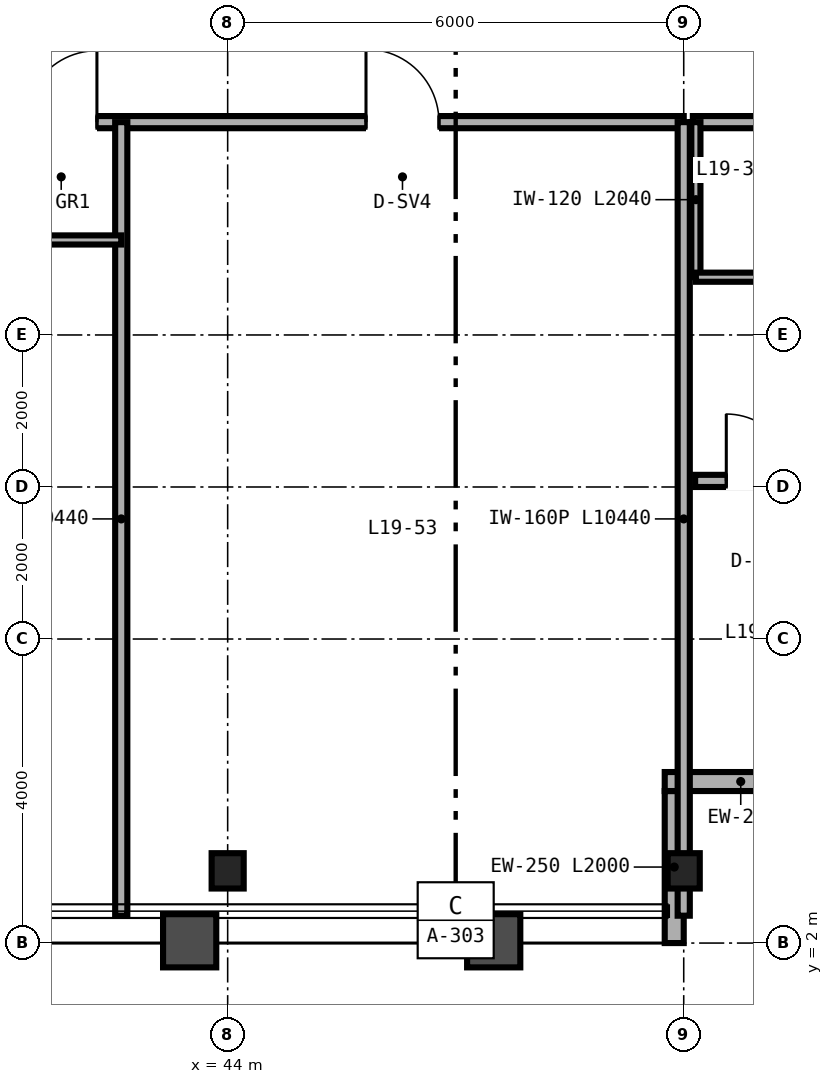
"""IFC4 building model, lengths in metres.
Left out: names, types, materials, properties, quantities, classifications, styles, units other than length and angle.
Written with IfcOpenShell. Run it as: python <this file> out.ifc"""

import sys

from ifc_helpers import new_model, si_unit, direction, frame, frame_2d, origin, origin_2d, place, context, subcontext, project, spatial, rectangle, i_section, extrude, source, transform, mapped, element, fill, save


model = new_model("IFC4")
c1 = context("Model", 3, precision=1e-05, world=origin(), true_north=direction((0.0, 1.0)))
c2 = subcontext(c1, "Body", "Model", "MODEL_VIEW")
j1 = project(units=[si_unit("LENGTHUNIT", "METRE"), si_unit("PLANEANGLEUNIT", "RADIAN")], contexts=[c1])
p1 = place(None, origin())
s1 = spatial("IfcSite", under=j1, at=p1, CompositionType="ELEMENT")
p2 = place(p1, origin())
s2 = spatial("IfcBuilding", under=s1, at=p2, CompositionType="ELEMENT")
p3 = place(p2, frame((0.0, 0.0, 78.0)))
s3 = spatial("IfcBuildingStorey", under=s2, at=p3, CompositionType="ELEMENT", Elevation=78.0)
m1 = source(origin(), c2, "Body", "SweptSolid", [
    extrude(i_section(OverallWidth=0.422, OverallDepth=0.465, WebThickness=0.045, FlangeThickness=0.073, FilletRadius=0.025, at=origin_2d()), origin(), (0.0, 0.0, 1.0), 3.35),
])
for number, where, z_axis, x_axis in (
    (1, (44.0, 2.95, 0.0), (0.0, 0.0, 1.0), (1.0, 0.0, 0.0)),
    (2, (50.0, 2.95, 0.0), (0.0, 0.0, 1.0), (1.0, 0.0, 0.0)),
):
    element("IfcColumn", number, at=place(p3, frame(where, z_axis=z_axis, x_axis=x_axis)), inside=s3, PredefinedType="COLUMN", context=c2, shape_type="MappedRepresentation", body=[
        mapped(m1, transform((0.0, 0.0, 0.0), scale=1.0)),
    ])
p4 = place(p3, frame((49.875, 2.0, 0.0), z_axis=(0.0, 0.0, 1.0), x_axis=(0.0, 1.0, 0.0)))
e3 = element("IfcWall", 3, at=p4, inside=s3, PredefinedType="SOLIDWALL", context=c2, shape_type="SweptSolid", body=[
    extrude(rectangle(XDim=2.0, YDim=0.25, at=frame_2d((1.0, 0.0))), origin(), (0.0, 0.0, 1.0), 2.657),
])
p5 = place(p3, frame((49.75, 4.125, 0.0), z_axis=(0.0, 0.0, 1.0), x_axis=(1.0, 0.0, 0.0)))
e4 = element("IfcWall", 4, at=p5, inside=s3, PredefinedType="SOLIDWALL", context=c2, shape_type="SweptSolid", body=[
    extrude(rectangle(XDim=2.0, YDim=0.25, at=frame_2d((1.0, 0.0))), origin(), (0.0, 0.0, 1.0), 3.35),
])
p6 = place(p3, frame((50.12, 12.8, 0.0), z_axis=(0.0, 0.0, 1.0), x_axis=(1.0, 0.0, 0.0)))
e5 = element("IfcWall", 5, at=p6, inside=s3, PredefinedType="PARTITIONING", context=c2, shape_type="SweptSolid", body=[
    extrude(rectangle(XDim=5.68, YDim=0.16, at=frame_2d((2.84, 0.0))), origin(), (0.0, 0.0, 1.0), 3.35),
])
p7 = place(p6, frame((3.15, 0.0, 0.0)))
e6 = element("IfcOpeningElement", 6, at=p7, cuts=e5, PredefinedType="OPENING", context=c2, shape_type="SweptSolid", body=[
    extrude(rectangle(XDim=0.94, YDim=2.15, at=frame_2d((0.47, 1.075))), frame((0.0, 0.09, 0.0), z_axis=(0.0, -1.0, 0.0), x_axis=(1.0, 0.0, 0.0)), (0.0, 0.0, 1.0), 0.18),
])
p8 = place(p3, frame((50.16, 10.76, 0.0), z_axis=(0.0, 0.0, 1.0), x_axis=(0.0, 1.0, 0.0)))
e7 = element("IfcWall", 7, at=p8, inside=s3, PredefinedType="PARTITIONING", context=c2, shape_type="SweptSolid", body=[
    extrude(rectangle(XDim=2.04, YDim=0.12, at=frame_2d((1.02, 0.0))), origin(), (0.0, 0.0, 1.0), 3.35),
])
p9 = place(p3, frame((50.16, 10.76, 0.0), z_axis=(0.0, 0.0, 1.0), x_axis=(1.0, 0.0, 0.0)))
e8 = element("IfcWall", 8, at=p9, inside=s3, PredefinedType="PARTITIONING", context=c2, shape_type="SweptSolid", body=[
    extrude(rectangle(XDim=1.65, YDim=0.12, at=frame_2d((0.825, 0.0))), origin(), (0.0, 0.0, 1.0), 3.35),
])
p10 = place(p3, frame((50.15, 8.08, 0.0), z_axis=(0.0, 0.0, 1.0), x_axis=(1.0, 0.0, 0.0)))
e9 = element("IfcWall", 9, at=p10, inside=s3, PredefinedType="PARTITIONING", context=c2, shape_type="SweptSolid", body=[
    extrude(rectangle(XDim=1.7, YDim=0.16, at=frame_2d((0.85, 0.0))), origin(), (0.0, 0.0, 1.0), 3.35),
])
p11 = place(p10, frame((0.41, 0.0, 0.0)))
e10 = element("IfcOpeningElement", 10, at=p11, cuts=e9, PredefinedType="OPENING", context=c2, shape_type="SweptSolid", body=[
    extrude(rectangle(XDim=0.88, YDim=2.15, at=frame_2d((0.44, 1.075))), frame((0.0, 0.09, 0.0), z_axis=(0.0, -1.0, 0.0), x_axis=(1.0, 0.0, 0.0)), (0.0, 0.0, 1.0), 0.18),
])
p12 = place(p3, frame((14.0, 12.8, 0.0), z_axis=(0.0, 0.0, 1.0), x_axis=(1.0, 0.0, 0.0)))
e11 = element("IfcWall", 11, at=p12, inside=s3, PredefinedType="PARTITIONING", context=c2, shape_type="SweptSolid", body=[
    extrude(rectangle(XDim=36.0, YDim=0.16, at=frame_2d((18.0, 0.0))), origin(), (0.0, 0.0, 1.0), 2.571),
])
p13 = place(p12, frame((5.9, 0.0, 0.0)))
e12 = element("IfcOpeningElement", 12, at=p13, cuts=e11, PredefinedType="OPENING", context=c2, shape_type="SweptSolid", body=[
    extrude(rectangle(XDim=0.98, YDim=2.2, at=frame_2d((0.49, 1.1))), frame((0.0, 0.09, 0.0), z_axis=(0.0, -1.0, 0.0), x_axis=(1.0, 0.0, 0.0)), (0.0, 0.0, 1.0), 0.18),
])
p14 = place(p12, frame((13.1, 0.0, 0.0)))
e13 = element("IfcOpeningElement", 13, at=p14, cuts=e11, PredefinedType="OPENING", context=c2, shape_type="SweptSolid", body=[
    extrude(rectangle(XDim=0.98, YDim=2.2, at=frame_2d((0.49, 1.1))), frame((0.0, 0.09, 0.0), z_axis=(0.0, -1.0, 0.0), x_axis=(1.0, 0.0, 0.0)), (0.0, 0.0, 1.0), 0.18),
])
p15 = place(p12, frame((20.34, 0.0, 0.0)))
e14 = element("IfcOpeningElement", 14, at=p15, cuts=e11, PredefinedType="OPENING", context=c2, shape_type="SweptSolid", body=[
    extrude(rectangle(XDim=0.94, YDim=2.15, at=frame_2d((0.47, 1.075))), frame((0.0, 0.09, 0.0), z_axis=(0.0, -1.0, 0.0), x_axis=(1.0, 0.0, 0.0)), (0.0, 0.0, 1.0), 0.18),
])
p16 = place(p12, frame((27.34, 0.0, 0.0)))
e15 = element("IfcOpeningElement", 15, at=p16, cuts=e11, PredefinedType="OPENING", context=c2, shape_type="SweptSolid", body=[
    extrude(rectangle(XDim=0.94, YDim=2.15, at=frame_2d((0.47, 1.075))), frame((0.0, 0.09, 0.0), z_axis=(0.0, -1.0, 0.0), x_axis=(1.0, 0.0, 0.0)), (0.0, 0.0, 1.0), 0.18),
])
p17 = place(p12, frame((31.82, 0.0, 0.0)))
e16 = element("IfcOpeningElement", 16, at=p17, cuts=e11, PredefinedType="OPENING", context=c2, shape_type="SweptSolid", body=[
    extrude(rectangle(XDim=0.96, YDim=2.15, at=frame_2d((0.48, 1.075))), frame((0.0, 0.09, 0.0), z_axis=(0.0, -1.0, 0.0), x_axis=(1.0, 0.0, 0.0)), (0.0, 0.0, 1.0), 0.18),
])
p18 = place(p3, frame((50.0, 2.36, 0.0), z_axis=(0.0, 0.0, 1.0), x_axis=(0.0, 1.0, 0.0)))
e17 = element("IfcWall", 17, at=p18, inside=s3, PredefinedType="PARTITIONING", context=c2, shape_type="SweptSolid", body=[
    extrude(rectangle(XDim=10.44, YDim=0.16, at=frame_2d((5.22, 0.0))), origin(), (0.0, 0.0, 1.0), 2.657),
])
p19 = place(p3, frame((42.6, 2.36, 0.0), z_axis=(0.0, 0.0, 1.0), x_axis=(0.0, 1.0, 0.0)))
e18 = element("IfcWall", 18, at=p19, inside=s3, PredefinedType="PARTITIONING", context=c2, shape_type="SweptSolid", body=[
    extrude(rectangle(XDim=10.44, YDim=0.16, at=frame_2d((5.22, 0.0))), origin(), (0.0, 0.0, 1.0), 2.813),
])
p20 = place(p3, frame((41.5, 11.25, 0.0), z_axis=(0.0, 0.0, 1.0), x_axis=(1.0, 0.0, 0.0)))
e19 = element("IfcWall", 19, at=p20, inside=s3, PredefinedType="PARTITIONING", context=c2, shape_type="SweptSolid", body=[
    extrude(rectangle(XDim=1.1, YDim=0.12, at=frame_2d((0.55, 0.0))), origin(), (0.0, 0.0, 1.0), 3.35),
])
m2 = source(origin(), c2, "Body", "SweptSolid", [
    extrude(rectangle(XDim=0.88, YDim=2.15, at=frame_2d((0.44, 1.075))), frame((0.0, 0.025, 0.0), z_axis=(0.0, -1.0, 0.0), x_axis=(1.0, 0.0, 0.0)), (0.0, 0.0, 1.0), 0.05),
])
p21 = place(p11, origin())
e20 = element("IfcDoor", 20, at=p21, inside=s3, OperationType="SINGLE_SWING_LEFT", PredefinedType="DOOR", context=c2, shape_type="MappedRepresentation", body=[
    mapped(m2, transform((0.0, 0.0, 0.0), scale=1.0)),
])
fill(e10, e20)
m3 = source(origin(), c2, "Body", "SweptSolid", [
    extrude(rectangle(XDim=0.94, YDim=2.15, at=frame_2d((0.47, 1.075))), frame((0.0, 0.025, 0.0), z_axis=(0.0, -1.0, 0.0), x_axis=(1.0, 0.0, 0.0)), (0.0, 0.0, 1.0), 0.05),
])
p22 = place(p16, origin())
e21 = element("IfcDoor", 21, at=p22, inside=s3, OperationType="SINGLE_SWING_RIGHT", PredefinedType="DOOR", context=c2, shape_type="MappedRepresentation", body=[
    mapped(m3, transform((0.0, 0.0, 0.0), scale=1.0)),
])
fill(e15, e21)
m4 = source(origin(), c2, "Body", "SweptSolid", [
    extrude(rectangle(XDim=0.96, YDim=2.15, at=frame_2d((0.48, 1.075))), frame((0.0, 0.025, 0.0), z_axis=(0.0, -1.0, 0.0), x_axis=(1.0, 0.0, 0.0)), (0.0, 0.0, 1.0), 0.05),
])
p23 = place(p17, origin())
e22 = element("IfcDoor", 22, at=p23, inside=s3, OperationType="SINGLE_SWING_LEFT", PredefinedType="DOOR", context=c2, shape_type="MappedRepresentation", body=[
    mapped(m4, transform((0.0, 0.0, 0.0), scale=1.0)),
])
fill(e16, e22)
save(model, sys.argv[1])
